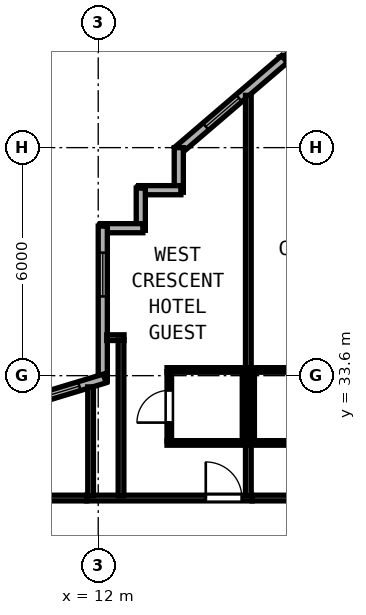
"""IFC4 building model, lengths in metres.
Left out: names, types, materials, properties, quantities, classifications, styles, units other than length and angle.
Written with IfcOpenShell. Run it as: python <this file> out.ifc"""

import sys

from ifc_helpers import new_model, si_unit, direction, frame, frame_2d, origin, place, context, subcontext, project, spatial, rectangle, extrude, element, fill, save


model = new_model("IFC4")
c1 = context("Model", 3, precision=1e-05, world=origin(), true_north=direction((0.0, 1.0)))
c2 = subcontext(c1, "Body", "Model", "MODEL_VIEW")
j1 = project(units=[si_unit("LENGTHUNIT", "METRE"), si_unit("PLANEANGLEUNIT", "RADIAN")], contexts=[c1])
p1 = place(None, origin())
s1 = spatial("IfcSite", under=j1, at=p1, CompositionType="ELEMENT")
p2 = place(p1, origin())
s2 = spatial("IfcBuilding", under=s1, at=p2, CompositionType="ELEMENT")
p3 = place(p2, frame((0.0, 0.0, 121.2)))
s3 = spatial("IfcBuildingStorey", under=s2, at=p3, CompositionType="ELEMENT", Elevation=121.2)
p4 = place(p3, frame((17.858, 42.226, 0.0), z_axis=(0.0, 0.0, 1.0), x_axis=(-0.948639166064, -0.316360131194, 0.0)))
e1 = element("IfcWall", 1, at=p4, inside=s3, PredefinedType="SOLIDWALL", context=c2, shape_type="SweptSolid", body=[
    extrude(rectangle(XDim=1.107, YDim=0.24, at=frame_2d((0.553, 0.0))), origin(), (0.0, 0.0, 1.0), 3.6),
])
p5 = place(p3, frame((16.902, 41.929, 0.0), z_axis=(0.0, 0.0, 1.0), x_axis=(-0.759275136126, -0.650769750112, 0.0)))
e2 = element("IfcWall", 2, at=p5, inside=s3, PredefinedType="SOLIDWALL", context=c2, shape_type="SweptSolid", body=[
    extrude(rectangle(XDim=3.719, YDim=0.24, at=frame_2d((1.86, 0.0))), origin(), (0.0, 0.0, 1.0), 3.6),
])
p6 = place(p5, frame((1.579, 0.0, 0.85)))
e3 = element("IfcOpeningElement", 3, at=p6, cuts=e2, PredefinedType="OPENING", context=c2, shape_type="SweptSolid", body=[
    extrude(rectangle(XDim=1.15, YDim=1.8, at=frame_2d((0.575, 0.9))), frame((0.0, 0.13, 0.0), z_axis=(0.0, -1.0, 0.0), x_axis=(1.0, 0.0, 0.0)), (0.0, 0.0, 1.0), 0.26),
])
p7 = place(p3, frame((14.12, 39.6, 0.0), z_axis=(0.0, 0.0, 1.0), x_axis=(0.0, -1.0, 0.0)))
e4 = element("IfcWall", 4, at=p7, inside=s3, PredefinedType="SOLIDWALL", context=c2, shape_type="SweptSolid", body=[
    extrude(rectangle(XDim=1.175, YDim=0.24, at=frame_2d((0.587, 0.0))), origin(), (0.0, 0.0, 1.0), 3.6),
])
p8 = place(p3, frame((14.175, 38.48, 0.0), z_axis=(0.0, 0.0, 1.0), x_axis=(-1.0, 0.0, 0.0)))
e5 = element("IfcWall", 5, at=p8, inside=s3, PredefinedType="SOLIDWALL", context=c2, shape_type="SweptSolid", body=[
    extrude(rectangle(XDim=1.11, YDim=0.24, at=frame_2d((0.555, 0.0))), origin(), (0.0, 0.0, 1.0), 3.6),
])
p9 = place(p3, frame((13.12, 38.535, 0.0), z_axis=(0.0, 0.0, 1.0), x_axis=(0.0, -1.0, 0.0)))
e6 = element("IfcWall", 6, at=p9, inside=s3, PredefinedType="SOLIDWALL", context=c2, shape_type="SweptSolid", body=[
    extrude(rectangle(XDim=1.11, YDim=0.24, at=frame_2d((0.555, 0.0))), origin(), (0.0, 0.0, 1.0), 3.6),
])
p10 = place(p3, frame((13.175, 37.48, 0.0), z_axis=(0.0, 0.0, 1.0), x_axis=(-1.0, 0.0, 0.0)))
e7 = element("IfcWall", 7, at=p10, inside=s3, PredefinedType="SOLIDWALL", context=c2, shape_type="SweptSolid", body=[
    extrude(rectangle(XDim=1.11, YDim=0.24, at=frame_2d((0.555, 0.0))), origin(), (0.0, 0.0, 1.0), 3.6),
])
p11 = place(p3, frame((12.12, 37.535, 0.0), z_axis=(0.0, 0.0, 1.0), x_axis=(0.0, -1.0, 0.0)))
e8 = element("IfcWall", 8, at=p11, inside=s3, PredefinedType="SOLIDWALL", context=c2, shape_type="SweptSolid", body=[
    extrude(rectangle(XDim=4.079, YDim=0.24, at=frame_2d((2.04, 0.0))), origin(), (0.0, 0.0, 1.0), 3.6),
])
p12 = place(p11, frame((0.7, 0.0, 0.85)))
e9 = element("IfcOpeningElement", 9, at=p12, cuts=e8, PredefinedType="OPENING", context=c2, shape_type="SweptSolid", body=[
    extrude(rectangle(XDim=1.15, YDim=1.8, at=frame_2d((0.575, 0.9))), frame((0.0, 0.13, 0.0), z_axis=(0.0, -1.0, 0.0), x_axis=(1.0, 0.0, 0.0)), (0.0, 0.0, 1.0), 0.26),
])
p13 = place(p3, frame((12.173, 33.527, 0.0), z_axis=(0.0, 0.0, 1.0), x_axis=(-0.957230199513, -0.289327401294, 0.0)))
e10 = element("IfcWall", 10, at=p13, inside=s3, PredefinedType="SOLIDWALL", context=c2, shape_type="SweptSolid", body=[
    extrude(rectangle(XDim=8.461, YDim=0.24, at=frame_2d((4.23, 0.0))), origin(), (0.0, 0.0, 1.0), 3.6),
])
p14 = place(p13, frame((0.7, 0.0, 0.85)))
e11 = element("IfcOpeningElement", 11, at=p14, cuts=e10, PredefinedType="OPENING", context=c2, shape_type="SweptSolid", body=[
    extrude(rectangle(XDim=1.15, YDim=1.8, at=frame_2d((0.575, 0.9))), frame((0.0, 0.13, 0.0), z_axis=(0.0, -1.0, 0.0), x_axis=(1.0, 0.0, 0.0)), (0.0, 0.0, 1.0), 0.26),
])
p15 = place(p13, frame((6.1, 0.0, 0.85)))
e12 = element("IfcOpeningElement", 12, at=p15, cuts=e10, PredefinedType="OPENING", context=c2, shape_type="SweptSolid", body=[
    extrude(rectangle(XDim=1.15, YDim=1.8, at=frame_2d((0.575, 0.9))), frame((0.0, 0.13, 0.0), z_axis=(0.0, -1.0, 0.0), x_axis=(1.0, 0.0, 0.0)), (0.0, 0.0, 1.0), 0.26),
])
p16 = place(p3, frame((11.7, 30.38, 0.0), z_axis=(0.0, 0.0, 1.0), x_axis=(1.0, 0.0, 0.0)))
e13 = element("IfcWall", 13, at=p16, inside=s3, PredefinedType="PARTITIONING", context=c2, shape_type="SweptSolid", body=[
    extrude(rectangle(XDim=4.35, YDim=0.15, at=frame_2d((2.175, 0.0))), origin(), (0.0, 0.0, 1.0), 3.6),
])
p17 = place(p16, frame((3.13, 0.0, 0.0)))
e14 = element("IfcOpeningElement", 14, at=p17, cuts=e13, PredefinedType="OPENING", context=c2, shape_type="SweptSolid", body=[
    extrude(rectangle(XDim=0.95, YDim=2.15, at=frame_2d((0.475, 1.075))), frame((0.0, 0.085, 0.0), z_axis=(0.0, -1.0, 0.0), x_axis=(1.0, 0.0, 0.0)), (0.0, 0.0, 1.0), 0.17),
])
p18 = place(p3, frame((11.8, 30.44, 0.0), z_axis=(0.0, 0.0, 1.0), x_axis=(0.0, 1.0, 0.0)))
e15 = element("IfcWall", 15, at=p18, inside=s3, PredefinedType="PARTITIONING", context=c2, shape_type="SweptSolid", body=[
    extrude(rectangle(XDim=2.865, YDim=0.15, at=frame_2d((1.432, 0.0))), origin(), (0.0, 0.0, 1.0), 3.6),
])
p19 = place(p3, frame((15.95, 30.44, 0.0), z_axis=(0.0, 0.0, 1.0), x_axis=(0.0, 1.0, 0.0)))
e16 = element("IfcWall", 16, at=p19, inside=s3, PredefinedType="PARTITIONING", context=c2, shape_type="SweptSolid", body=[
    extrude(rectangle(XDim=10.535, YDim=0.15, at=frame_2d((5.268, 0.0))), origin(), (0.0, 0.0, 1.0), 3.6),
])
for number, where, z_axis, x_axis in (
    (17, (13.81, 33.75, 0.0), (0.0, 0.0, 1.0), (1.0, 0.0, 0.0)),
    (18, (13.81, 31.83, 0.0), (0.0, 0.0, 1.0), (1.0, 0.0, 0.0)),
):
    element("IfcWall", number, at=place(p3, frame(where, z_axis=z_axis, x_axis=x_axis)), inside=s3, PredefinedType="PARTITIONING", context=c2, shape_type="SweptSolid", body=[
        extrude(rectangle(XDim=2.08, YDim=0.12, at=frame_2d((1.04, 0.0))), origin(), (0.0, 0.0, 1.0), 3.6),
    ])
p20 = place(p3, frame((13.87, 31.875, 0.0), z_axis=(0.0, 0.0, 1.0), x_axis=(0.0, 1.0, 0.0)))
e19 = element("IfcWall", 19, at=p20, inside=s3, PredefinedType="PARTITIONING", context=c2, shape_type="SweptSolid", body=[
    extrude(rectangle(XDim=1.83, YDim=0.12, at=frame_2d((0.915, 0.0))), origin(), (0.0, 0.0, 1.0), 3.6),
])
p21 = place(p20, frame((1.34, 0.0, 0.0), z_axis=(0.0, 0.0, 1.0), x_axis=(-1.0, 0.0, 0.0)))
e20 = element("IfcOpeningElement", 20, at=p21, cuts=e19, PredefinedType="OPENING", context=c2, shape_type="SweptSolid", body=[
    extrude(rectangle(XDim=0.85, YDim=2.1, at=frame_2d((0.425, 1.05))), frame((0.0, 0.07, 0.0), z_axis=(0.0, -1.0, 0.0), x_axis=(1.0, 0.0, 0.0)), (0.0, 0.0, 1.0), 0.14),
])
p22 = place(p3, frame((15.85, 31.875, 0.0), z_axis=(0.0, 0.0, 1.0), x_axis=(0.0, 1.0, 0.0)))
e21 = element("IfcWall", 21, at=p22, inside=s3, PredefinedType="PARTITIONING", context=c2, shape_type="SweptSolid", body=[
    extrude(rectangle(XDim=1.83, YDim=0.12, at=frame_2d((0.915, 0.0))), origin(), (0.0, 0.0, 1.0), 3.6),
])
p23 = place(p3, frame((16.052, 30.38, 0.0), z_axis=(0.0, 0.0, 1.0), x_axis=(1.0, 0.0, 0.0)))
e22 = element("IfcWall", 22, at=p23, inside=s3, PredefinedType="PARTITIONING", context=c2, shape_type="SweptSolid", body=[
    extrude(rectangle(XDim=4.018, YDim=0.15, at=frame_2d((2.009, 0.0))), origin(), (0.0, 0.0, 1.0), 3.6),
])
p24 = place(p23, frame((2.81, 0.0, 0.0)))
e23 = element("IfcOpeningElement", 23, at=p24, cuts=e22, PredefinedType="OPENING", context=c2, shape_type="SweptSolid", body=[
    extrude(rectangle(XDim=0.95, YDim=2.15, at=frame_2d((0.475, 1.075))), frame((0.0, 0.085, 0.0), z_axis=(0.0, -1.0, 0.0), x_axis=(1.0, 0.0, 0.0)), (0.0, 0.0, 1.0), 0.17),
])
for number, where, z_axis, x_axis in (
    (24, (16.01, 33.75, 0.0), (0.0, 0.0, 1.0), (1.0, 0.0, 0.0)),
    (25, (16.01, 31.83, 0.0), (0.0, 0.0, 1.0), (1.0, 0.0, 0.0)),
):
    element("IfcWall", number, at=place(p3, frame(where, z_axis=z_axis, x_axis=x_axis)), inside=s3, PredefinedType="PARTITIONING", context=c2, shape_type="SweptSolid", body=[
        extrude(rectangle(XDim=2.08, YDim=0.12, at=frame_2d((1.04, 0.0))), origin(), (0.0, 0.0, 1.0), 3.6),
    ])
p25 = place(p3, frame((16.05, 31.875, 0.0), z_axis=(0.0, 0.0, 1.0), x_axis=(0.0, 1.0, 0.0)))
e26 = element("IfcWall", 26, at=p25, inside=s3, PredefinedType="PARTITIONING", context=c2, shape_type="SweptSolid", body=[
    extrude(rectangle(XDim=1.83, YDim=0.12, at=frame_2d((0.915, 0.0))), origin(), (0.0, 0.0, 1.0), 3.6),
])
p26 = place(p3, frame((12.225, 34.6, 0.0), z_axis=(0.0, 0.0, 1.0), x_axis=(1.0, 0.0, 0.0)))
e27 = element("IfcWall", 27, at=p26, inside=s3, PredefinedType="PARTITIONING", context=c2, shape_type="SweptSolid", body=[
    extrude(rectangle(XDim=0.455, YDim=0.15, at=frame_2d((0.228, 0.0))), origin(), (0.0, 0.0, 1.0), 3.6),
])
p27 = place(p3, frame((3.614, 30.38, 0.0), z_axis=(0.0, 0.0, 1.0), x_axis=(1.0, 0.0, 0.0)))
e28 = element("IfcWall", 28, at=p27, inside=s3, PredefinedType="PARTITIONING", context=c2, shape_type="SweptSolid", body=[
    extrude(rectangle(XDim=8.084, YDim=0.15, at=frame_2d((4.042, 0.0))), origin(), (0.0, 0.0, 1.0), 3.6),
])
p28 = place(p27, frame((5.024, 0.0, 0.0)))
e29 = element("IfcOpeningElement", 29, at=p28, cuts=e28, PredefinedType="OPENING", context=c2, shape_type="SweptSolid", body=[
    extrude(rectangle(XDim=0.95, YDim=2.12, at=frame_2d((0.475, 1.06))), frame((0.0, 0.085, 0.0), z_axis=(0.0, -1.0, 0.0), x_axis=(1.0, 0.0, 0.0)), (0.0, 0.0, 1.0), 0.17),
])
p29 = place(p3, frame((12.6, 30.44, 0.0), z_axis=(0.0, 0.0, 1.0), x_axis=(0.0, 1.0, 0.0)))
e30 = element("IfcWall", 30, at=p29, inside=s3, PredefinedType="PARTITIONING", context=c2, shape_type="SweptSolid", body=[
    extrude(rectangle(XDim=4.1, YDim=0.15, at=frame_2d((2.05, 0.0))), origin(), (0.0, 0.0, 1.0), 3.6),
])
p30 = place(p6, origin())
e31 = element("IfcWindow", 31, at=p30, inside=s3, PartitioningType="SINGLE_PANEL", PredefinedType="WINDOW", context=c2, shape_type="SweptSolid", body=[
    extrude(rectangle(XDim=1.15, YDim=1.8, at=frame_2d((0.575, 0.9))), frame((0.0, 0.03, 0.0), z_axis=(0.0, -1.0, 0.0), x_axis=(1.0, 0.0, 0.0)), (0.0, 0.0, 1.0), 0.06),
])
fill(e3, e31)
p31 = place(p12, origin())
e32 = element("IfcWindow", 32, at=p31, inside=s3, PartitioningType="SINGLE_PANEL", PredefinedType="WINDOW", context=c2, shape_type="SweptSolid", body=[
    extrude(rectangle(XDim=1.15, YDim=1.8, at=frame_2d((0.575, 0.9))), frame((0.0, 0.03, 0.0), z_axis=(0.0, -1.0, 0.0), x_axis=(1.0, 0.0, 0.0)), (0.0, 0.0, 1.0), 0.06),
])
fill(e9, e32)
p32 = place(p14, origin())
e33 = element("IfcWindow", 33, at=p32, inside=s3, PartitioningType="SINGLE_PANEL", PredefinedType="WINDOW", context=c2, shape_type="SweptSolid", body=[
    extrude(rectangle(XDim=1.15, YDim=1.8, at=frame_2d((0.575, 0.9))), frame((0.0, 0.03, 0.0), z_axis=(0.0, -1.0, 0.0), x_axis=(1.0, 0.0, 0.0)), (0.0, 0.0, 1.0), 0.06),
])
fill(e11, e33)
p33 = place(p17, origin())
e34 = element("IfcDoor", 34, at=p33, inside=s3, OperationType="SINGLE_SWING_LEFT", PredefinedType="DOOR", context=c2, shape_type="SweptSolid", body=[
    extrude(rectangle(XDim=0.95, YDim=2.15, at=frame_2d((0.475, 1.075))), frame((0.0, 0.025, 0.0), z_axis=(0.0, -1.0, 0.0), x_axis=(1.0, 0.0, 0.0)), (0.0, 0.0, 1.0), 0.05),
])
fill(e14, e34)
p34 = place(p21, origin())
e35 = element("IfcDoor", 35, at=p34, inside=s3, OperationType="SINGLE_SWING_RIGHT", PredefinedType="DOOR", context=c2, shape_type="SweptSolid", body=[
    extrude(rectangle(XDim=0.85, YDim=2.1, at=frame_2d((0.425, 1.05))), frame((0.0, 0.025, 0.0), z_axis=(0.0, -1.0, 0.0), x_axis=(1.0, 0.0, 0.0)), (0.0, 0.0, 1.0), 0.05),
])
fill(e20, e35)
save(model, sys.argv[1])
